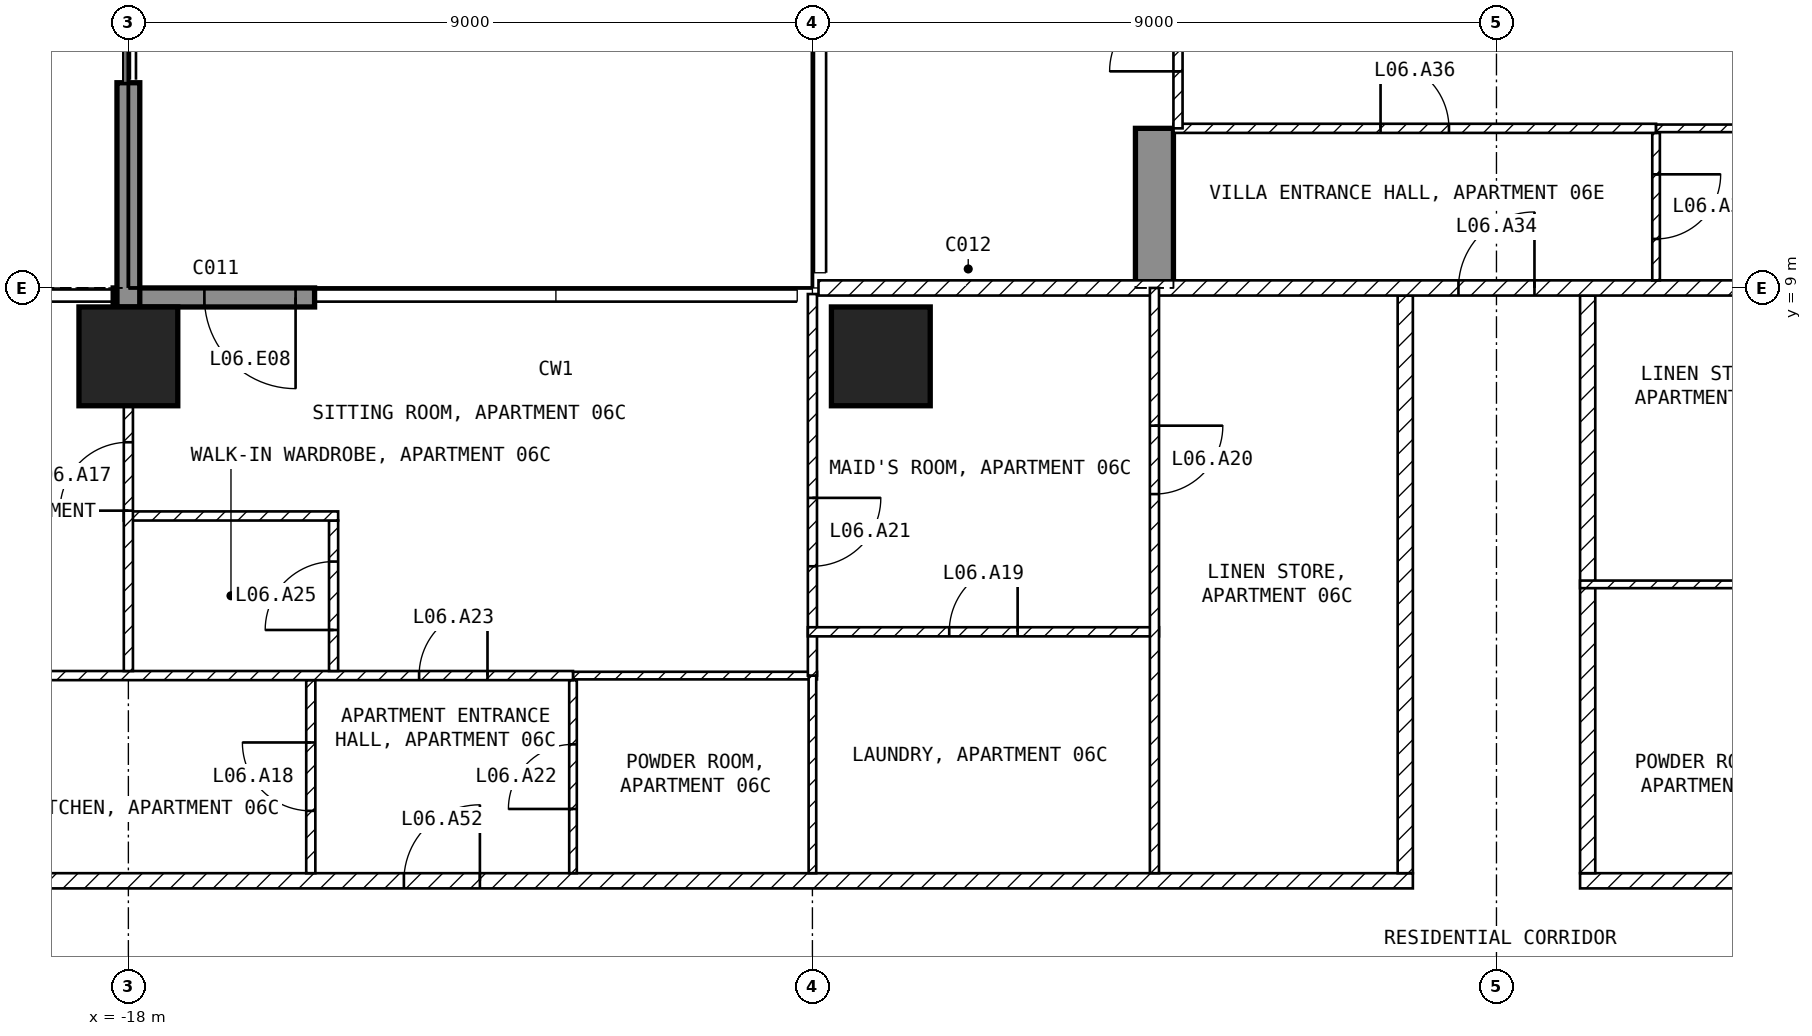
"""IFC4 building model, lengths in metres.
Left out: names, types, materials, properties, quantities, classifications, styles, units other than length and angle.
Written with IfcOpenShell. Run it as: python <this file> out.ifc"""

import sys

from ifc_helpers import new_model, si_unit, direction, frame, frame_2d, origin, origin_2d, place, context, subcontext, project, spatial, polyline, rectangle, outline, extrude, element, fill, save


model = new_model("IFC4")
c1 = context("Model", 3, precision=1e-05, world=origin(), true_north=direction((0.0, 1.0)))
c2 = subcontext(c1, "Body", "Model", "MODEL_VIEW")
j1 = project(units=[si_unit("LENGTHUNIT", "METRE"), si_unit("PLANEANGLEUNIT", "RADIAN")], contexts=[c1])
p1 = place(None, origin())
s1 = spatial("IfcSite", under=j1, at=p1, CompositionType="ELEMENT")
p2 = place(p1, origin())
s2 = spatial("IfcBuilding", under=s1, at=p2, CompositionType="ELEMENT")
p3 = place(p2, frame((0.0, 0.0, 40.0)))
s3 = spatial("IfcBuildingStorey", under=s2, at=p3, CompositionType="ELEMENT", Elevation=40.0)
for number, where, z_axis, x_axis in (
    (1, (-18.0, 8.1, -0.25), (0.0, 0.0, 1.0), (1.0, 0.0, 0.0)),
    (2, (-8.1, 8.1, -0.25), (0.0, 0.0, 1.0), (1.0, 0.0, 0.0)),
):
    element("IfcColumn", number, at=place(p3, frame(where, z_axis=z_axis, x_axis=x_axis)), inside=s3, PredefinedType="COLUMN", context=c2, shape_type="SweptSolid", body=[
        extrude(rectangle(XDim=1.3, YDim=1.3, at=origin_2d()), origin(), (0.0, 0.0, 1.0), 3.5),
    ])
p4 = place(p3, frame((-4.75, 9.0, -0.25), z_axis=(1.0, 0.0, 0.0), x_axis=(0.0, 1.0, 0.0)))
e3 = element("IfcWall", 3, at=p4, inside=s3, PredefinedType="SHEAR", context=c2, shape_type="SweptSolid", body=[
    extrude(outline(polyline([(0.0, 0.0), (2.1, 0.0), (2.1, 2.65), (4.5, 2.65), (4.5, 0.0), (9.9, 0.0), (9.9, 2.65), (12.3, 2.65), (12.3, 0.0), (16.45, 0.0), (16.45, 3.5), (0.0, 3.5), (0.0, 0.0)])), origin(), (0.0, 0.0, 1.0), 0.5),
])
p5 = place(p3, frame((-15.55, 8.875, 0.0), z_axis=(0.0, 0.0, 1.0), x_axis=(-1.0, 0.0, 0.0)))
e4 = element("IfcWall", 4, at=p5, inside=s3, PredefinedType="SOLIDWALL", context=c2, shape_type="SweptSolid", body=[
    extrude(rectangle(XDim=2.65, YDim=0.25, at=frame_2d((1.325, 0.0))), origin(), (0.0, 0.0, 1.0), 3.25),
])
p6 = place(p5, frame((0.25, 0.0, 0.0)))
e5 = element("IfcOpeningElement", 5, at=p6, cuts=e4, PredefinedType="OPENING", context=c2, shape_type="SweptSolid", body=[
    extrude(rectangle(XDim=1.2, YDim=2.4, at=frame_2d((0.6, 1.2))), frame((0.0, 0.135, 0.0), z_axis=(0.0, -1.0, 0.0), x_axis=(1.0, 0.0, 0.0)), (0.0, 0.0, 1.0), 0.27),
])
p7 = place(p3, frame((-18.0, 8.75, 0.0), z_axis=(0.0, 0.0, 1.0), x_axis=(0.0, 1.0, 0.0)))
e6 = element("IfcWall", 6, at=p7, inside=s3, PredefinedType="SOLIDWALL", context=c2, shape_type="SweptSolid", body=[
    extrude(rectangle(XDim=2.95, YDim=0.3, at=frame_2d((1.475, 0.0))), origin(), (0.0, 0.0, 1.0), 3.25),
])
p8 = place(p3, frame((1.1, 1.2, 0.0), z_axis=(0.0, 0.0, 1.0), x_axis=(1.0, 0.0, 0.0)))
e7 = element("IfcWall", 7, at=p8, inside=s3, PredefinedType="PARTITIONING", context=c2, shape_type="SweptSolid", body=[
    extrude(rectangle(XDim=20.5, YDim=0.2, at=frame_2d((10.25, 0.0))), origin(), (0.0, 0.0, 1.0), 3.25),
])
p9 = place(p8, frame((8.6, 0.0, 0.0)))
e8 = element("IfcOpeningElement", 8, at=p9, cuts=e7, PredefinedType="OPENING", context=c2, shape_type="SweptSolid", body=[
    extrude(rectangle(XDim=1.0, YDim=2.1, at=frame_2d((0.5, 1.05))), frame((0.0, 0.11, 0.0), z_axis=(0.0, -1.0, 0.0), x_axis=(1.0, 0.0, 0.0)), (0.0, 0.0, 1.0), 0.22),
])
p10 = place(p3, frame((1.2, 8.9, 0.0), z_axis=(0.0, 0.0, 1.0), x_axis=(0.0, -1.0, 0.0)))
e9 = element("IfcWall", 9, at=p10, inside=s3, PredefinedType="PARTITIONING", context=c2, shape_type="SweptSolid", body=[
    extrude(rectangle(XDim=7.6, YDim=0.2, at=frame_2d((3.8, 0.0))), origin(), (0.0, 0.0, 1.0), 3.25),
])
p11 = place(p3, frame((-21.6, 1.2, 0.0), z_axis=(0.0, 0.0, 1.0), x_axis=(1.0, 0.0, 0.0)))
e10 = element("IfcWall", 10, at=p11, inside=s3, PredefinedType="PARTITIONING", context=c2, shape_type="SweptSolid", body=[
    extrude(rectangle(XDim=20.5, YDim=0.2, at=frame_2d((10.25, 0.0))), origin(), (0.0, 0.0, 1.0), 3.25),
])
p12 = place(p11, frame((7.225, 0.0, 0.0)))
e11 = element("IfcOpeningElement", 11, at=p12, cuts=e10, PredefinedType="OPENING", context=c2, shape_type="SweptSolid", body=[
    extrude(rectangle(XDim=1.0, YDim=2.1, at=frame_2d((0.5, 1.05))), frame((0.0, 0.11, 0.0), z_axis=(0.0, -1.0, 0.0), x_axis=(1.0, 0.0, 0.0)), (0.0, 0.0, 1.0), 0.22),
])
p13 = place(p3, frame((-1.2, 1.3, 0.0), z_axis=(0.0, 0.0, 1.0), x_axis=(0.0, 1.0, 0.0)))
e12 = element("IfcWall", 12, at=p13, inside=s3, PredefinedType="PARTITIONING", context=c2, shape_type="SweptSolid", body=[
    extrude(rectangle(XDim=7.6, YDim=0.2, at=frame_2d((3.8, 0.0))), origin(), (0.0, 0.0, 1.0), 3.25),
])
p14 = place(p3, frame((-8.92, 9.0, 0.0), z_axis=(0.0, 0.0, 1.0), x_axis=(1.0, 0.0, 0.0)))
e13 = element("IfcWall", 13, at=p14, inside=s3, PredefinedType="PARTITIONING", context=c2, shape_type="SweptSolid", body=[
    extrude(rectangle(XDim=17.84, YDim=0.2, at=frame_2d((8.92, 0.0))), origin(), (0.0, 0.0, 1.0), 3.25),
])
p15 = place(p14, frame((8.42, 0.0, 0.0)))
e14 = element("IfcOpeningElement", 14, at=p15, cuts=e13, PredefinedType="OPENING", context=c2, shape_type="SweptSolid", body=[
    extrude(rectangle(XDim=1.0, YDim=2.1, at=frame_2d((0.5, 1.05))), frame((0.0, 0.11, 0.0), z_axis=(0.0, -1.0, 0.0), x_axis=(1.0, 0.0, 0.0)), (0.0, 0.0, 1.0), 0.22),
])
p16 = place(p3, frame((1.1, 5.1, 0.0), z_axis=(0.0, 0.0, 1.0), x_axis=(1.0, 0.0, 0.0)))
e15 = element("IfcWall", 15, at=p16, inside=s3, PredefinedType="PARTITIONING", context=c2, shape_type="SweptSolid", body=[
    extrude(rectangle(XDim=3.46, YDim=0.1, at=frame_2d((1.73, 0.0))), origin(), (0.0, 0.0, 1.0), 3.25),
])
p17 = place(p3, frame((-12.15, 1.3, 0.0), z_axis=(0.0, 0.0, 1.0), x_axis=(0.0, 1.0, 0.0)))
e16 = element("IfcWall", 16, at=p17, inside=s3, PredefinedType="PARTITIONING", context=c2, shape_type="SweptSolid", body=[
    extrude(rectangle(XDim=2.54, YDim=0.1, at=frame_2d((1.27, 0.0))), origin(), (0.0, 0.0, 1.0), 3.25),
])
p18 = place(p17, frame((0.845, 0.0, 0.0)))
e17 = element("IfcOpeningElement", 17, at=p18, cuts=e16, PredefinedType="OPENING", context=c2, shape_type="SweptSolid", body=[
    extrude(rectangle(XDim=0.85, YDim=2.1, at=frame_2d((0.425, 1.05))), frame((0.0, 0.06, 0.0), z_axis=(0.0, -1.0, 0.0), x_axis=(1.0, 0.0, 0.0)), (0.0, 0.0, 1.0), 0.12),
])
p19 = place(p3, frame((-12.15, 3.9, 0.0), z_axis=(0.0, 0.0, 1.0), x_axis=(1.0, 0.0, 0.0)))
e18 = element("IfcWall", 18, at=p19, inside=s3, PredefinedType="PARTITIONING", context=c2, shape_type="SweptSolid", body=[
    extrude(rectangle(XDim=3.21, YDim=0.1, at=frame_2d((1.605, 0.0))), origin(), (0.0, 0.0, 1.0), 3.25),
])
p20 = place(p3, frame((-9.0, 3.9, 0.0), z_axis=(0.0, 0.0, 1.0), x_axis=(0.0, -1.0, 0.0)))
e19 = element("IfcWall", 19, at=p20, inside=s3, PredefinedType="PARTITIONING", context=c2, shape_type="SweptSolid", body=[
    extrude(rectangle(XDim=2.6, YDim=0.1, at=frame_2d((1.3, 0.0))), origin(), (0.0, 0.0, 1.0), 3.25),
])
p21 = place(p3, frame((-15.6, 1.3, 0.0), z_axis=(0.0, 0.0, 1.0), x_axis=(0.0, 1.0, 0.0)))
e20 = element("IfcWall", 20, at=p21, inside=s3, PredefinedType="PARTITIONING", context=c2, shape_type="SweptSolid", body=[
    extrude(rectangle(XDim=2.54, YDim=0.12, at=frame_2d((1.27, 0.0))), origin(), (0.0, 0.0, 1.0), 3.25),
])
p22 = place(p21, frame((0.82, 0.0, 0.0)))
e21 = element("IfcOpeningElement", 21, at=p22, cuts=e20, PredefinedType="OPENING", context=c2, shape_type="SweptSolid", body=[
    extrude(rectangle(XDim=0.9, YDim=2.1, at=frame_2d((0.45, 1.05))), frame((0.0, 0.07, 0.0), z_axis=(0.0, -1.0, 0.0), x_axis=(1.0, 0.0, 0.0)), (0.0, 0.0, 1.0), 0.14),
])
p23 = place(p3, frame((-21.6, 3.9, 0.0), z_axis=(0.0, 0.0, 1.0), x_axis=(1.0, 0.0, 0.0)))
e22 = element("IfcWall", 22, at=p23, inside=s3, PredefinedType="PARTITIONING", context=c2, shape_type="SweptSolid", body=[
    extrude(rectangle(XDim=9.45, YDim=0.12, at=frame_2d((4.725, 0.0))), origin(), (0.0, 0.0, 1.0), 3.25),
])
p24 = place(p23, frame((7.425, 0.0, 0.0)))
e23 = element("IfcOpeningElement", 23, at=p24, cuts=e22, PredefinedType="OPENING", context=c2, shape_type="SweptSolid", body=[
    extrude(rectangle(XDim=0.9, YDim=2.1, at=frame_2d((0.45, 1.05))), frame((0.0, 0.07, 0.0), z_axis=(0.0, -1.0, 0.0), x_axis=(1.0, 0.0, 0.0)), (0.0, 0.0, 1.0), 0.14),
])
p25 = place(p23, frame((0.45, 0.0, 0.0)))
e24 = element("IfcOpeningElement", 24, at=p25, cuts=e22, PredefinedType="OPENING", context=c2, shape_type="SweptSolid", body=[
    extrude(rectangle(XDim=0.9, YDim=2.1, at=frame_2d((0.45, 1.05))), frame((0.0, 0.07, 0.0), z_axis=(0.0, -1.0, 0.0), x_axis=(1.0, 0.0, 0.0)), (0.0, 0.0, 1.0), 0.14),
])
p26 = place(p3, frame((-15.3, 3.96, 0.0), z_axis=(0.0, 0.0, 1.0), x_axis=(0.0, 1.0, 0.0)))
e25 = element("IfcWall", 25, at=p26, inside=s3, PredefinedType="PARTITIONING", context=c2, shape_type="SweptSolid", body=[
    extrude(rectangle(XDim=1.98, YDim=0.12, at=frame_2d((0.99, 0.0))), origin(), (0.0, 0.0, 1.0), 3.25),
])
p27 = place(p26, frame((0.54, 0.0, 0.0)))
e26 = element("IfcOpeningElement", 26, at=p27, cuts=e25, PredefinedType="OPENING", context=c2, shape_type="SweptSolid", body=[
    extrude(rectangle(XDim=0.9, YDim=2.1, at=frame_2d((0.45, 1.05))), frame((0.0, 0.07, 0.0), z_axis=(0.0, -1.0, 0.0), x_axis=(1.0, 0.0, 0.0)), (0.0, 0.0, 1.0), 0.14),
])
p28 = place(p3, frame((-15.24, 6.0, 0.0), z_axis=(0.0, 0.0, 1.0), x_axis=(-1.0, 0.0, 0.0)))
e27 = element("IfcWall", 27, at=p28, inside=s3, PredefinedType="PARTITIONING", context=c2, shape_type="SweptSolid", body=[
    extrude(rectangle(XDim=2.82, YDim=0.12, at=frame_2d((1.41, 0.0))), origin(), (0.0, 0.0, 1.0), 3.25),
])
p29 = place(p3, frame((-18.0, 3.96, 0.0), z_axis=(0.0, 0.0, 1.0), x_axis=(0.0, 1.0, 0.0)))
e28 = element("IfcWall", 28, at=p29, inside=s3, PredefinedType="PARTITIONING", context=c2, shape_type="SweptSolid", body=[
    extrude(rectangle(XDim=3.49, YDim=0.12, at=frame_2d((1.745, 0.0))), origin(), (0.0, 0.0, 1.0), 2.346),
])
p30 = place(p29, frame((2.11, 0.0, 0.0)))
e29 = element("IfcOpeningElement", 29, at=p30, cuts=e28, PredefinedType="OPENING", context=c2, shape_type="SweptSolid", body=[
    extrude(rectangle(XDim=0.9, YDim=2.1, at=frame_2d((0.45, 1.05))), frame((0.0, 0.07, 0.0), z_axis=(0.0, -1.0, 0.0), x_axis=(1.0, 0.0, 0.0)), (0.0, 0.0, 1.0), 0.14),
])
p31 = place(p3, frame((-9.0, 8.92, 0.0), z_axis=(0.0, 0.0, 1.0), x_axis=(0.0, -1.0, 0.0)))
e30 = element("IfcWall", 30, at=p31, inside=s3, PredefinedType="PARTITIONING", context=c2, shape_type="SweptSolid", body=[
    extrude(rectangle(XDim=5.02, YDim=0.12, at=frame_2d((2.51, 0.0))), origin(), (0.0, 0.0, 1.0), 3.25),
])
p32 = place(p31, frame((2.682, 0.0, 0.0)))
e31 = element("IfcOpeningElement", 31, at=p32, cuts=e30, PredefinedType="OPENING", context=c2, shape_type="SweptSolid", body=[
    extrude(rectangle(XDim=0.9, YDim=2.1, at=frame_2d((0.45, 1.05))), frame((0.0, 0.07, 0.0), z_axis=(0.0, -1.0, 0.0), x_axis=(1.0, 0.0, 0.0)), (0.0, 0.0, 1.0), 0.14),
])
p33 = place(p3, frame((-9.06, 4.476, 0.0), z_axis=(0.0, 0.0, 1.0), x_axis=(1.0, 0.0, 0.0)))
e32 = element("IfcWall", 32, at=p33, inside=s3, PredefinedType="PARTITIONING", context=c2, shape_type="SweptSolid", body=[
    extrude(rectangle(XDim=4.62, YDim=0.12, at=frame_2d((2.31, 0.0))), origin(), (0.0, 0.0, 1.0), 3.25),
])
p34 = place(p33, frame((1.86, 0.0, 0.0)))
e33 = element("IfcOpeningElement", 33, at=p34, cuts=e32, PredefinedType="OPENING", context=c2, shape_type="SweptSolid", body=[
    extrude(rectangle(XDim=0.9, YDim=2.1, at=frame_2d((0.45, 1.05))), frame((0.0, 0.07, 0.0), z_axis=(0.0, -1.0, 0.0), x_axis=(1.0, 0.0, 0.0)), (0.0, 0.0, 1.0), 0.14),
])
p35 = place(p3, frame((-4.5, 9.0, 0.0), z_axis=(0.0, 0.0, 1.0), x_axis=(0.0, -1.0, 0.0)))
e34 = element("IfcWall", 34, at=p35, inside=s3, PredefinedType="PARTITIONING", context=c2, shape_type="SweptSolid", body=[
    extrude(rectangle(XDim=7.7, YDim=0.12, at=frame_2d((3.85, 0.0))), origin(), (0.0, 0.0, 1.0), 3.25),
])
p36 = place(p35, frame((1.812, 0.0, 0.0)))
e35 = element("IfcOpeningElement", 35, at=p36, cuts=e34, PredefinedType="OPENING", context=c2, shape_type="SweptSolid", body=[
    extrude(rectangle(XDim=0.9, YDim=2.1, at=frame_2d((0.45, 1.05))), frame((0.0, 0.07, 0.0), z_axis=(0.0, -1.0, 0.0), x_axis=(1.0, 0.0, 0.0)), (0.0, 0.0, 1.0), 0.14),
])
p37 = place(p3, frame((2.1, 11.04, 0.0), z_axis=(0.0, 0.0, 1.0), x_axis=(0.0, -1.0, 0.0)))
e36 = element("IfcWall", 36, at=p37, inside=s3, PredefinedType="PARTITIONING", context=c2, shape_type="SweptSolid", body=[
    extrude(rectangle(XDim=1.94, YDim=0.1, at=frame_2d((0.97, 0.0))), origin(), (0.0, 0.0, 1.0), 3.25),
])
p38 = place(p37, frame((0.545, 0.0, 0.0)))
e37 = element("IfcOpeningElement", 37, at=p38, cuts=e36, PredefinedType="OPENING", context=c2, shape_type="SweptSolid", body=[
    extrude(rectangle(XDim=0.85, YDim=2.1, at=frame_2d((0.425, 1.05))), frame((0.0, 0.06, 0.0), z_axis=(0.0, -1.0, 0.0), x_axis=(1.0, 0.0, 0.0)), (0.0, 0.0, 1.0), 0.12),
])
p39 = place(p3, frame((-4.25, 11.1, 0.0), z_axis=(0.0, 0.0, 1.0), x_axis=(1.0, 0.0, 0.0)))
e38 = element("IfcWall", 38, at=p39, inside=s3, PredefinedType="PARTITIONING", context=c2, shape_type="SweptSolid", body=[
    extrude(rectangle(XDim=6.35, YDim=0.12, at=frame_2d((3.175, 0.0))), origin(), (0.0, 0.0, 1.0), 3.25),
])
p40 = place(p39, frame((2.725, 0.0, 0.0)))
e39 = element("IfcOpeningElement", 39, at=p40, cuts=e38, PredefinedType="OPENING", context=c2, shape_type="SweptSolid", body=[
    extrude(rectangle(XDim=0.9, YDim=2.1, at=frame_2d((0.45, 1.05))), frame((0.0, 0.07, 0.0), z_axis=(0.0, -1.0, 0.0), x_axis=(1.0, 0.0, 0.0)), (0.0, 0.0, 1.0), 0.14),
])
p41 = place(p3, frame((2.1, 11.1, 0.0), z_axis=(0.0, 0.0, 1.0), x_axis=(1.0, 0.0, 0.0)))
e40 = element("IfcWall", 40, at=p41, inside=s3, PredefinedType="PARTITIONING", context=c2, shape_type="SweptSolid", body=[
    extrude(rectangle(XDim=2.15, YDim=0.1, at=frame_2d((1.075, 0.0))), origin(), (0.0, 0.0, 1.0), 3.25),
])
p42 = place(p3, frame((-4.19, 11.1, 0.0), z_axis=(0.0, 0.0, 1.0), x_axis=(0.0, 1.0, 0.0)))
e41 = element("IfcWall", 41, at=p42, inside=s3, PredefinedType="PARTITIONING", context=c2, shape_type="SweptSolid", body=[
    extrude(rectangle(XDim=2.4, YDim=0.12, at=frame_2d((1.2, 0.0))), origin(), (0.0, 0.0, 1.0), 2.4),
])
p43 = place(p42, frame((0.75, 0.0, 0.0)))
e42 = element("IfcOpeningElement", 42, at=p43, cuts=e41, PredefinedType="OPENING", context=c2, shape_type="SweptSolid", body=[
    extrude(rectangle(XDim=0.9, YDim=2.1, at=frame_2d((0.45, 1.05))), frame((0.0, 0.07, 0.0), z_axis=(0.0, -1.0, 0.0), x_axis=(1.0, 0.0, 0.0)), (0.0, 0.0, 1.0), 0.14),
])
p44 = place(p6, origin())
e43 = element("IfcDoor", 43, at=p44, inside=s3, OperationType="SINGLE_SWING_LEFT", PredefinedType="DOOR", context=c2, shape_type="SweptSolid", body=[
    extrude(rectangle(XDim=1.2, YDim=2.4, at=frame_2d((0.6, 1.2))), frame((0.0, 0.025, 0.0), z_axis=(0.0, -1.0, 0.0), x_axis=(1.0, 0.0, 0.0)), (0.0, 0.0, 1.0), 0.05),
])
fill(e5, e43)
p45 = place(p30, origin())
e44 = element("IfcDoor", 44, at=p45, inside=s3, OperationType="SINGLE_SWING_LEFT", PredefinedType="DOOR", context=c2, shape_type="SweptSolid", body=[
    extrude(rectangle(XDim=0.9, YDim=2.1, at=frame_2d((0.45, 1.05))), frame((0.0, 0.025, 0.0), z_axis=(0.0, -1.0, 0.0), x_axis=(1.0, 0.0, 0.0)), (0.0, 0.0, 1.0), 0.05),
])
fill(e29, e44)
p46 = place(p22, origin())
e45 = element("IfcDoor", 45, at=p46, inside=s3, OperationType="SINGLE_SWING_RIGHT", PredefinedType="DOOR", context=c2, shape_type="SweptSolid", body=[
    extrude(rectangle(XDim=0.9, YDim=2.1, at=frame_2d((0.45, 1.05))), frame((0.0, 0.025, 0.0), z_axis=(0.0, -1.0, 0.0), x_axis=(1.0, 0.0, 0.0)), (0.0, 0.0, 1.0), 0.05),
])
fill(e21, e45)
p47 = place(p34, origin())
e46 = element("IfcDoor", 46, at=p47, inside=s3, OperationType="SINGLE_SWING_RIGHT", PredefinedType="DOOR", context=c2, shape_type="SweptSolid", body=[
    extrude(rectangle(XDim=0.9, YDim=2.1, at=frame_2d((0.45, 1.05))), frame((0.0, 0.025, 0.0), z_axis=(0.0, -1.0, 0.0), x_axis=(1.0, 0.0, 0.0)), (0.0, 0.0, 1.0), 0.05),
])
fill(e33, e46)
p48 = place(p36, origin())
e47 = element("IfcDoor", 47, at=p48, inside=s3, OperationType="SINGLE_SWING_LEFT", PredefinedType="DOOR", context=c2, shape_type="SweptSolid", body=[
    extrude(rectangle(XDim=0.9, YDim=2.1, at=frame_2d((0.45, 1.05))), frame((0.0, 0.025, 0.0), z_axis=(0.0, -1.0, 0.0), x_axis=(1.0, 0.0, 0.0)), (0.0, 0.0, 1.0), 0.05),
])
fill(e35, e47)
p49 = place(p32, origin())
e48 = element("IfcDoor", 48, at=p49, inside=s3, OperationType="SINGLE_SWING_LEFT", PredefinedType="DOOR", context=c2, shape_type="SweptSolid", body=[
    extrude(rectangle(XDim=0.9, YDim=2.1, at=frame_2d((0.45, 1.05))), frame((0.0, 0.025, 0.0), z_axis=(0.0, -1.0, 0.0), x_axis=(1.0, 0.0, 0.0)), (0.0, 0.0, 1.0), 0.05),
])
fill(e31, e48)
p50 = place(p18, origin())
e49 = element("IfcDoor", 49, at=p50, inside=s3, OperationType="SINGLE_SWING_LEFT", PredefinedType="DOOR", context=c2, shape_type="SweptSolid", body=[
    extrude(rectangle(XDim=0.85, YDim=2.1, at=frame_2d((0.425, 1.05))), frame((0.0, 0.025, 0.0), z_axis=(0.0, -1.0, 0.0), x_axis=(1.0, 0.0, 0.0)), (0.0, 0.0, 1.0), 0.05),
])
fill(e17, e49)
p51 = place(p24, origin())
e50 = element("IfcDoor", 50, at=p51, inside=s3, OperationType="SINGLE_SWING_RIGHT", PredefinedType="DOOR", context=c2, shape_type="SweptSolid", body=[
    extrude(rectangle(XDim=0.9, YDim=2.1, at=frame_2d((0.45, 1.05))), frame((0.0, 0.025, 0.0), z_axis=(0.0, -1.0, 0.0), x_axis=(1.0, 0.0, 0.0)), (0.0, 0.0, 1.0), 0.05),
])
fill(e23, e50)
p52 = place(p27, origin())
e51 = element("IfcDoor", 51, at=p52, inside=s3, OperationType="SINGLE_SWING_LEFT", PredefinedType="DOOR", context=c2, shape_type="SweptSolid", body=[
    extrude(rectangle(XDim=0.9, YDim=2.1, at=frame_2d((0.45, 1.05))), frame((0.0, 0.025, 0.0), z_axis=(0.0, -1.0, 0.0), x_axis=(1.0, 0.0, 0.0)), (0.0, 0.0, 1.0), 0.05),
])
fill(e26, e51)
p53 = place(p15, origin())
e52 = element("IfcDoor", 52, at=p53, inside=s3, OperationType="SINGLE_SWING_RIGHT", PredefinedType="DOOR", context=c2, shape_type="SweptSolid", body=[
    extrude(rectangle(XDim=1.0, YDim=2.1, at=frame_2d((0.5, 1.05))), frame((0.0, 0.025, 0.0), z_axis=(0.0, -1.0, 0.0), x_axis=(1.0, 0.0, 0.0)), (0.0, 0.0, 1.0), 0.05),
])
fill(e14, e52)
p54 = place(p38, origin())
e53 = element("IfcDoor", 53, at=p54, inside=s3, OperationType="SINGLE_SWING_LEFT", PredefinedType="DOOR", context=c2, shape_type="SweptSolid", body=[
    extrude(rectangle(XDim=0.85, YDim=2.1, at=frame_2d((0.425, 1.05))), frame((0.0, 0.025, 0.0), z_axis=(0.0, -1.0, 0.0), x_axis=(1.0, 0.0, 0.0)), (0.0, 0.0, 1.0), 0.05),
])
fill(e37, e53)
p55 = place(p40, origin())
e54 = element("IfcDoor", 54, at=p55, inside=s3, OperationType="SINGLE_SWING_LEFT", PredefinedType="DOOR", context=c2, shape_type="SweptSolid", body=[
    extrude(rectangle(XDim=0.9, YDim=2.1, at=frame_2d((0.45, 1.05))), frame((0.0, 0.025, 0.0), z_axis=(0.0, -1.0, 0.0), x_axis=(1.0, 0.0, 0.0)), (0.0, 0.0, 1.0), 0.05),
])
fill(e39, e54)
p56 = place(p12, origin())
e55 = element("IfcDoor", 55, at=p56, inside=s3, OperationType="SINGLE_SWING_RIGHT", PredefinedType="DOOR", context=c2, shape_type="SweptSolid", body=[
    extrude(rectangle(XDim=1.0, YDim=2.1, at=frame_2d((0.5, 1.05))), frame((0.0, 0.025, 0.0), z_axis=(0.0, -1.0, 0.0), x_axis=(1.0, 0.0, 0.0)), (0.0, 0.0, 1.0), 0.05),
])
fill(e11, e55)
p57 = place(p43, origin())
e56 = element("IfcDoor", 56, at=p57, inside=s3, OperationType="SINGLE_SWING_LEFT", PredefinedType="DOOR", context=c2, shape_type="SweptSolid", body=[
    extrude(rectangle(XDim=0.9, YDim=2.1, at=frame_2d((0.45, 1.05))), frame((0.0, 0.025, 0.0), z_axis=(0.0, -1.0, 0.0), x_axis=(1.0, 0.0, 0.0)), (0.0, 0.0, 1.0), 0.05),
])
fill(e42, e56)
save(model, sys.argv[1])
